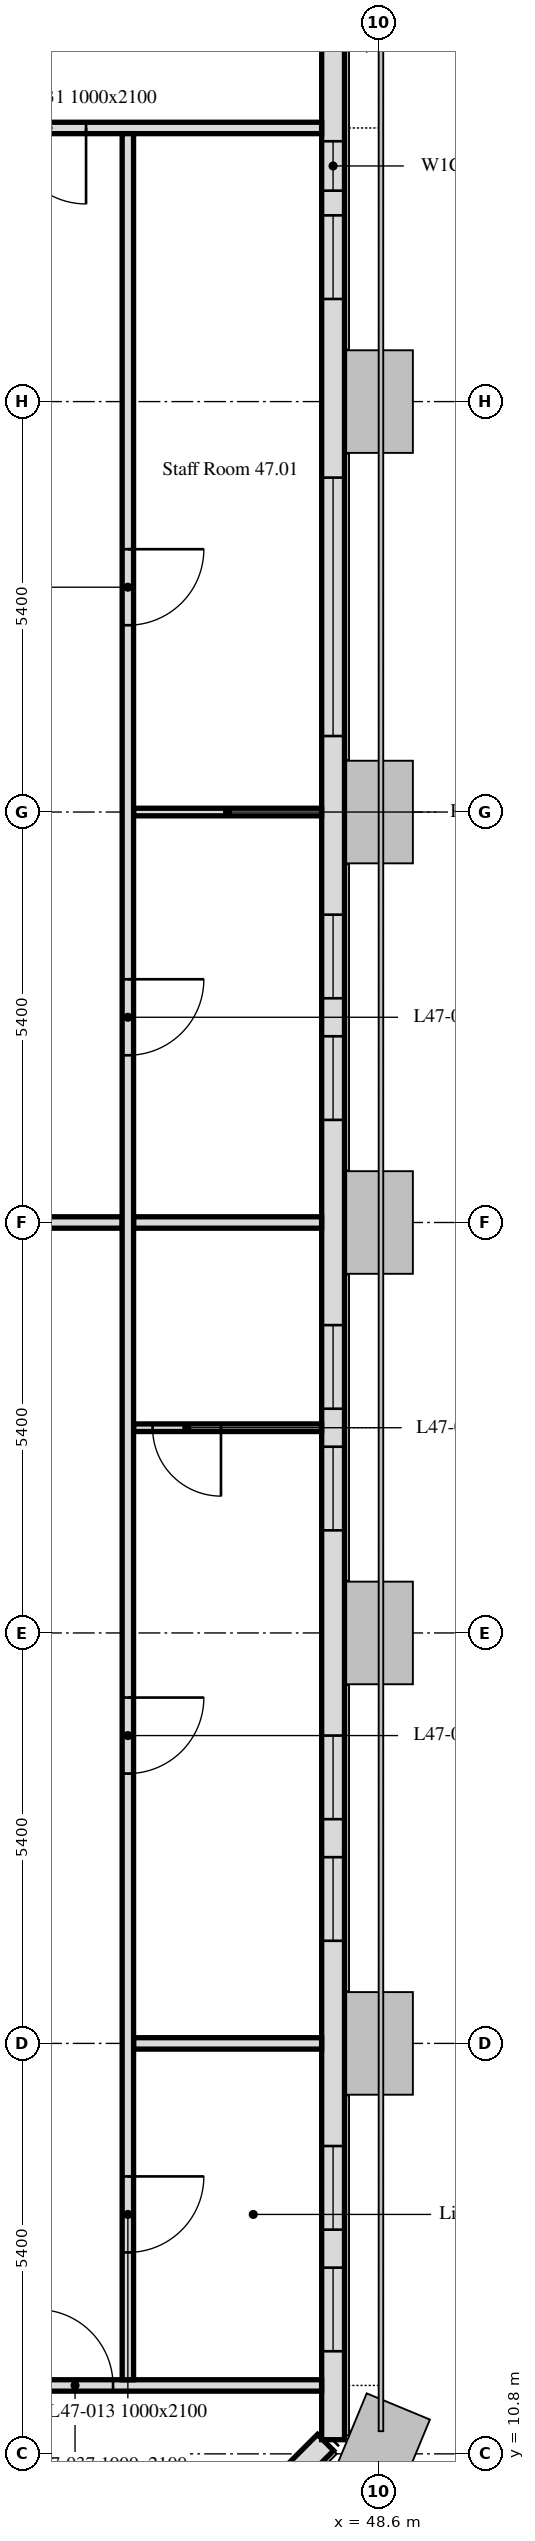
"""IFC4 building model, lengths in metres.
Left out: names, types, materials, properties, quantities, classifications, styles, units other than length and angle.
Written with IfcOpenShell. Run it as: python <this file> out.ifc"""

import sys

from ifc_helpers import new_model, si_unit, direction, frame, frame_2d, origin, place, context, subcontext, project, spatial, rectangle, extrude, element, fill, save


model = new_model("IFC4")
c1 = context("Model", 3, precision=1e-05, world=origin(), true_north=direction((0.0, 1.0)))
c2 = subcontext(c1, "Body", "Model", "MODEL_VIEW")
j1 = project(units=[si_unit("LENGTHUNIT", "METRE"), si_unit("PLANEANGLEUNIT", "RADIAN")], contexts=[c1])
p1 = place(None, origin())
s1 = spatial("IfcSite", under=j1, at=p1, CompositionType="ELEMENT")
p2 = place(p1, origin())
s2 = spatial("IfcBuilding", under=s1, at=p2, CompositionType="ELEMENT")
p3 = place(p2, frame((0.0, 0.0, 193.9)))
s3 = spatial("IfcBuildingStorey", under=s2, at=p3, CompositionType="ELEMENT", Elevation=193.9)
p4 = place(p3, frame((43.051, 6.099, 0.0), z_axis=(0.0, 0.0, 1.0), x_axis=(0.707106781187, 0.707106781187, 0.0)))
e1 = element("IfcWall", 1, at=p4, inside=s3, PredefinedType="SOLIDWALL", context=c2, shape_type="SweptSolid", body=[
    extrude(rectangle(XDim=6.86, YDim=0.3, at=frame_2d((3.43, 0.0))), origin(), (0.0, 0.0, 1.0), 3.0),
])
p5 = place(p4, frame((1.73, 0.0, 0.9)))
e2 = element("IfcOpeningElement", 2, at=p5, cuts=e1, PredefinedType="OPENING", context=c2, shape_type="SweptSolid", body=[
    extrude(rectangle(XDim=3.4, YDim=1.7, at=frame_2d((1.7, 0.85))), frame((0.0, 0.16, 0.0), z_axis=(0.0, -1.0, 0.0), x_axis=(1.0, 0.0, 0.0)), (0.0, 0.0, 1.0), 0.32),
])
p6 = place(p3, frame((48.0, 10.986, 0.0), z_axis=(0.0, 0.0, 1.0), x_axis=(0.0, 1.0, 0.0)))
e3 = element("IfcWall", 3, at=p6, inside=s3, PredefinedType="SOLIDWALL", context=c2, shape_type="SweptSolid", body=[
    extrude(rectangle(XDim=32.027, YDim=0.3, at=frame_2d((16.014, 0.0))), origin(), (0.0, 0.0, 1.0), 3.0),
])
p7 = place(p6, frame((1.164, 0.0, 0.9)))
e4 = element("IfcOpeningElement", 4, at=p7, cuts=e3, PredefinedType="OPENING", context=c2, shape_type="SweptSolid", body=[
    extrude(rectangle(XDim=1.1, YDim=1.7, at=frame_2d((0.55, 0.85))), frame((0.0, 0.16, 0.0), z_axis=(0.0, -1.0, 0.0), x_axis=(1.0, 0.0, 0.0)), (0.0, 0.0, 1.0), 0.32),
])
p8 = place(p6, frame((2.764, 0.0, 0.9)))
e5 = element("IfcOpeningElement", 5, at=p8, cuts=e3, PredefinedType="OPENING", context=c2, shape_type="SweptSolid", body=[
    extrude(rectangle(XDim=1.1, YDim=1.7, at=frame_2d((0.55, 0.85))), frame((0.0, 0.16, 0.0), z_axis=(0.0, -1.0, 0.0), x_axis=(1.0, 0.0, 0.0)), (0.0, 0.0, 1.0), 0.32),
])
p9 = place(p6, frame((6.564, 0.0, 0.9)))
e6 = element("IfcOpeningElement", 6, at=p9, cuts=e3, PredefinedType="OPENING", context=c2, shape_type="SweptSolid", body=[
    extrude(rectangle(XDim=1.1, YDim=1.7, at=frame_2d((0.55, 0.85))), frame((0.0, 0.16, 0.0), z_axis=(0.0, -1.0, 0.0), x_axis=(1.0, 0.0, 0.0)), (0.0, 0.0, 1.0), 0.32),
])
p10 = place(p6, frame((8.164, 0.0, 0.9)))
e7 = element("IfcOpeningElement", 7, at=p10, cuts=e3, PredefinedType="OPENING", context=c2, shape_type="SweptSolid", body=[
    extrude(rectangle(XDim=1.1, YDim=1.7, at=frame_2d((0.55, 0.85))), frame((0.0, 0.16, 0.0), z_axis=(0.0, -1.0, 0.0), x_axis=(1.0, 0.0, 0.0)), (0.0, 0.0, 1.0), 0.32),
])
p11 = place(p6, frame((11.964, 0.0, 0.9)))
e8 = element("IfcOpeningElement", 8, at=p11, cuts=e3, PredefinedType="OPENING", context=c2, shape_type="SweptSolid", body=[
    extrude(rectangle(XDim=1.1, YDim=1.7, at=frame_2d((0.55, 0.85))), frame((0.0, 0.16, 0.0), z_axis=(0.0, -1.0, 0.0), x_axis=(1.0, 0.0, 0.0)), (0.0, 0.0, 1.0), 0.32),
])
p12 = place(p6, frame((13.564, 0.0, 0.9)))
e9 = element("IfcOpeningElement", 9, at=p12, cuts=e3, PredefinedType="OPENING", context=c2, shape_type="SweptSolid", body=[
    extrude(rectangle(XDim=1.1, YDim=1.7, at=frame_2d((0.55, 0.85))), frame((0.0, 0.16, 0.0), z_axis=(0.0, -1.0, 0.0), x_axis=(1.0, 0.0, 0.0)), (0.0, 0.0, 1.0), 0.32),
])
p13 = place(p6, frame((17.364, 0.0, 0.9)))
e10 = element("IfcOpeningElement", 10, at=p13, cuts=e3, PredefinedType="OPENING", context=c2, shape_type="SweptSolid", body=[
    extrude(rectangle(XDim=1.1, YDim=1.7, at=frame_2d((0.55, 0.85))), frame((0.0, 0.16, 0.0), z_axis=(0.0, -1.0, 0.0), x_axis=(1.0, 0.0, 0.0)), (0.0, 0.0, 1.0), 0.32),
])
p14 = place(p6, frame((18.964, 0.0, 0.9)))
e11 = element("IfcOpeningElement", 11, at=p14, cuts=e3, PredefinedType="OPENING", context=c2, shape_type="SweptSolid", body=[
    extrude(rectangle(XDim=1.1, YDim=1.7, at=frame_2d((0.55, 0.85))), frame((0.0, 0.16, 0.0), z_axis=(0.0, -1.0, 0.0), x_axis=(1.0, 0.0, 0.0)), (0.0, 0.0, 1.0), 0.32),
])
p15 = place(p6, frame((22.414, 0.0, 0.9)))
e12 = element("IfcOpeningElement", 12, at=p15, cuts=e3, PredefinedType="OPENING", context=c2, shape_type="SweptSolid", body=[
    extrude(rectangle(XDim=3.4, YDim=1.7, at=frame_2d((1.7, 0.85))), frame((0.0, 0.16, 0.0), z_axis=(0.0, -1.0, 0.0), x_axis=(1.0, 0.0, 0.0)), (0.0, 0.0, 1.0), 0.32),
])
p16 = place(p6, frame((28.164, 0.0, 0.9)))
e13 = element("IfcOpeningElement", 13, at=p16, cuts=e3, PredefinedType="OPENING", context=c2, shape_type="SweptSolid", body=[
    extrude(rectangle(XDim=1.1, YDim=1.7, at=frame_2d((0.55, 0.85))), frame((0.0, 0.16, 0.0), z_axis=(0.0, -1.0, 0.0), x_axis=(1.0, 0.0, 0.0)), (0.0, 0.0, 1.0), 0.32),
])
p17 = place(p6, frame((29.589, 0.0, 0.9)))
e14 = element("IfcOpeningElement", 14, at=p17, cuts=e3, PredefinedType="OPENING", context=c2, shape_type="SweptSolid", body=[
    extrude(rectangle(XDim=0.65, YDim=1.7, at=frame_2d((0.325, 0.85))), frame((0.0, 0.16, 0.0), z_axis=(0.0, -1.0, 0.0), x_axis=(1.0, 0.0, 0.0)), (0.0, 0.0, 1.0), 0.32),
])
p18 = place(p3, frame((45.375, 32.4, 0.0), z_axis=(0.0, 0.0, 1.0), x_axis=(1.0, 0.0, 0.0)))
e15 = element("IfcWall", 15, at=p18, inside=s3, PredefinedType="PARTITIONING", context=c2, shape_type="SweptSolid", body=[
    extrude(rectangle(XDim=2.474, YDim=0.1, at=frame_2d((1.237, 0.0))), origin(), (0.0, 0.0, 1.0), 2.4),
])
p19 = place(p3, frame((47.849, 41.4, 0.0), z_axis=(0.0, 0.0, 1.0), x_axis=(-1.0, 0.0, 0.0)))
e16 = element("IfcWall", 16, at=p19, inside=s3, PredefinedType="PARTITIONING", context=c2, shape_type="SweptSolid", body=[
    extrude(rectangle(XDim=41.698, YDim=0.15, at=frame_2d((20.849, 0.0))), origin(), (0.0, 0.0, 1.0), 2.4),
])
p20 = place(p19, frame((39.249, 0.0, 0.0)))
e17 = element("IfcOpeningElement", 17, at=p20, cuts=e16, PredefinedType="OPENING", context=c2, shape_type="SweptSolid", body=[
    extrude(rectangle(XDim=1.0, YDim=2.1, at=frame_2d((0.5, 1.05))), frame((0.0, 0.075, 0.0), z_axis=(0.0, -1.0, 0.0), x_axis=(1.0, 0.0, 0.0)), (0.0, 0.0, 1.0), 0.15),
])
p21 = place(p19, frame((11.449, 0.0, 0.0)))
e18 = element("IfcOpeningElement", 18, at=p21, cuts=e16, PredefinedType="OPENING", context=c2, shape_type="SweptSolid", body=[
    extrude(rectangle(XDim=1.0, YDim=2.1, at=frame_2d((0.5, 1.05))), frame((0.0, 0.075, 0.0), z_axis=(0.0, -1.0, 0.0), x_axis=(1.0, 0.0, 0.0)), (0.0, 0.0, 1.0), 0.15),
])
p22 = place(p19, frame((3.099, 0.0, 0.0)))
e19 = element("IfcOpeningElement", 19, at=p22, cuts=e16, PredefinedType="OPENING", context=c2, shape_type="SweptSolid", body=[
    extrude(rectangle(XDim=1.0, YDim=2.1, at=frame_2d((0.5, 1.05))), frame((0.0, 0.075, 0.0), z_axis=(0.0, -1.0, 0.0), x_axis=(1.0, 0.0, 0.0)), (0.0, 0.0, 1.0), 0.15),
])
p23 = place(p19, frame((23.049, 0.0, 0.0)))
e20 = element("IfcOpeningElement", 20, at=p23, cuts=e16, PredefinedType="OPENING", context=c2, shape_type="SweptSolid", body=[
    extrude(rectangle(XDim=1.0, YDim=2.1, at=frame_2d((0.5, 1.05))), frame((0.0, 0.075, 0.0), z_axis=(0.0, -1.0, 0.0), x_axis=(1.0, 0.0, 0.0)), (0.0, 0.0, 1.0), 0.15),
])
p24 = place(p3, frame((45.375, 27.0, 0.0), z_axis=(0.0, 0.0, 1.0), x_axis=(1.0, 0.0, 0.0)))
e21 = element("IfcWall", 21, at=p24, inside=s3, PredefinedType="PARTITIONING", context=c2, shape_type="SweptSolid", body=[
    extrude(rectangle(XDim=2.474, YDim=0.15, at=frame_2d((1.237, 0.0))), origin(), (0.0, 0.0, 1.0), 2.4),
])
p25 = place(p3, frame((43.2, 27.0, 0.0), z_axis=(0.0, 0.0, 1.0), x_axis=(1.0, 0.0, 0.0)))
e22 = element("IfcWall", 22, at=p25, inside=s3, PredefinedType="PARTITIONING", context=c2, shape_type="SweptSolid", body=[
    extrude(rectangle(XDim=2.025, YDim=0.15, at=frame_2d((1.013, 0.0))), origin(), (0.0, 0.0, 1.0), 2.4),
])
p26 = place(p3, frame((47.849, 16.2, 0.0), z_axis=(0.0, 0.0, 1.0), x_axis=(-1.0, 0.0, 0.0)))
e23 = element("IfcWall", 23, at=p26, inside=s3, PredefinedType="PARTITIONING", context=c2, shape_type="SweptSolid", body=[
    extrude(rectangle(XDim=2.474, YDim=0.15, at=frame_2d((1.237, 0.0))), origin(), (0.0, 0.0, 1.0), 2.4),
])
p27 = place(p3, frame((6.151, 11.7, 0.0), z_axis=(0.0, 0.0, 1.0), x_axis=(1.0, 0.0, 0.0)))
e24 = element("IfcWall", 24, at=p27, inside=s3, PredefinedType="PARTITIONING", context=c2, shape_type="SweptSolid", body=[
    extrude(rectangle(XDim=41.698, YDim=0.15, at=frame_2d((20.849, 0.0))), origin(), (0.0, 0.0, 1.0), 3.0),
])
p28 = place(p27, frame((17.649, 0.0, 0.0)))
e25 = element("IfcOpeningElement", 25, at=p28, cuts=e24, PredefinedType="OPENING", context=c2, shape_type="SweptSolid", body=[
    extrude(rectangle(XDim=1.0, YDim=2.1, at=frame_2d((0.5, 1.05))), frame((0.0, 0.075, 0.0), z_axis=(0.0, -1.0, 0.0), x_axis=(1.0, 0.0, 0.0)), (0.0, 0.0, 1.0), 0.15),
])
p29 = place(p27, frame((1.449, 0.0, 0.0)))
e26 = element("IfcOpeningElement", 26, at=p29, cuts=e24, PredefinedType="OPENING", context=c2, shape_type="SweptSolid", body=[
    extrude(rectangle(XDim=1.0, YDim=2.1, at=frame_2d((0.5, 1.05))), frame((0.0, 0.075, 0.0), z_axis=(0.0, -1.0, 0.0), x_axis=(1.0, 0.0, 0.0)), (0.0, 0.0, 1.0), 0.15),
])
p30 = place(p27, frame((29.249, 0.0, 0.0)))
e27 = element("IfcOpeningElement", 27, at=p30, cuts=e24, PredefinedType="OPENING", context=c2, shape_type="SweptSolid", body=[
    extrude(rectangle(XDim=1.0, YDim=2.1, at=frame_2d((0.5, 1.05))), frame((0.0, 0.075, 0.0), z_axis=(0.0, -1.0, 0.0), x_axis=(1.0, 0.0, 0.0)), (0.0, 0.0, 1.0), 0.15),
])
p31 = place(p27, frame((37.954, 0.0, 0.0)))
e28 = element("IfcOpeningElement", 28, at=p31, cuts=e24, PredefinedType="OPENING", context=c2, shape_type="SweptSolid", body=[
    extrude(rectangle(XDim=1.0, YDim=2.1, at=frame_2d((0.5, 1.05))), frame((0.0, 0.075, 0.0), z_axis=(0.0, -1.0, 0.0), x_axis=(1.0, 0.0, 0.0)), (0.0, 0.0, 1.0), 0.15),
])
p32 = place(p3, frame((47.849, 24.3, 0.0), z_axis=(0.0, 0.0, 1.0), x_axis=(-1.0, 0.0, 0.0)))
e29 = element("IfcWall", 29, at=p32, inside=s3, PredefinedType="PARTITIONING", context=c2, shape_type="SweptSolid", body=[
    extrude(rectangle(XDim=2.474, YDim=0.1, at=frame_2d((1.237, 0.0))), origin(), (0.0, 0.0, 1.0), 3.0),
])
p33 = place(p32, frame((1.324, 0.0, 0.0)))
e30 = element("IfcOpeningElement", 30, at=p33, cuts=e29, PredefinedType="OPENING", context=c2, shape_type="SweptSolid", body=[
    extrude(rectangle(XDim=0.9, YDim=2.1, at=frame_2d((0.45, 1.05))), frame((0.0, 0.05, 0.0), z_axis=(0.0, -1.0, 0.0), x_axis=(1.0, 0.0, 0.0)), (0.0, 0.0, 1.0), 0.1),
])
p34 = place(p3, frame((45.3, 41.325, 0.0), z_axis=(0.0, 0.0, 1.0), x_axis=(0.0, -1.0, 0.0)))
e31 = element("IfcWall", 31, at=p34, inside=s3, PredefinedType="PARTITIONING", context=c2, shape_type="SweptSolid", body=[
    extrude(rectangle(XDim=29.55, YDim=0.15, at=frame_2d((14.775, 0.0))), origin(), (0.0, 0.0, 1.0), 2.4),
])
p35 = place(p34, frame((5.467, 0.0, 0.0)))
e32 = element("IfcOpeningElement", 32, at=p35, cuts=e31, PredefinedType="OPENING", context=c2, shape_type="SweptSolid", body=[
    extrude(rectangle(XDim=1.0, YDim=2.1, at=frame_2d((0.5, 1.05))), frame((0.0, 0.075, 0.0), z_axis=(0.0, -1.0, 0.0), x_axis=(1.0, 0.0, 0.0)), (0.0, 0.0, 1.0), 0.15),
])
p36 = place(p34, frame((11.125, 0.0, 0.0)))
e33 = element("IfcOpeningElement", 33, at=p36, cuts=e31, PredefinedType="OPENING", context=c2, shape_type="SweptSolid", body=[
    extrude(rectangle(XDim=1.0, YDim=2.1, at=frame_2d((0.5, 1.05))), frame((0.0, 0.075, 0.0), z_axis=(0.0, -1.0, 0.0), x_axis=(1.0, 0.0, 0.0)), (0.0, 0.0, 1.0), 0.15),
])
p37 = place(p34, frame((26.875, 0.0, 0.0)))
e34 = element("IfcOpeningElement", 34, at=p37, cuts=e31, PredefinedType="OPENING", context=c2, shape_type="SweptSolid", body=[
    extrude(rectangle(XDim=1.0, YDim=2.1, at=frame_2d((0.5, 1.05))), frame((0.0, 0.075, 0.0), z_axis=(0.0, -1.0, 0.0), x_axis=(1.0, 0.0, 0.0)), (0.0, 0.0, 1.0), 0.15),
])
p38 = place(p34, frame((20.575, 0.0, 0.0)))
e35 = element("IfcOpeningElement", 35, at=p38, cuts=e31, PredefinedType="OPENING", context=c2, shape_type="SweptSolid", body=[
    extrude(rectangle(XDim=1.0, YDim=2.1, at=frame_2d((0.5, 1.05))), frame((0.0, 0.075, 0.0), z_axis=(0.0, -1.0, 0.0), x_axis=(1.0, 0.0, 0.0)), (0.0, 0.0, 1.0), 0.15),
])
p39 = place(p7, origin())
e36 = element("IfcWindow", 36, at=p39, inside=s3, PartitioningType="SINGLE_PANEL", PredefinedType="WINDOW", context=c2, shape_type="SweptSolid", body=[
    extrude(rectangle(XDim=1.1, YDim=1.7, at=frame_2d((0.55, 0.85))), frame((0.0, 0.03, 0.0), z_axis=(0.0, -1.0, 0.0), x_axis=(1.0, 0.0, 0.0)), (0.0, 0.0, 1.0), 0.06),
])
fill(e4, e36)
p40 = place(p8, origin())
e37 = element("IfcWindow", 37, at=p40, inside=s3, PartitioningType="SINGLE_PANEL", PredefinedType="WINDOW", context=c2, shape_type="SweptSolid", body=[
    extrude(rectangle(XDim=1.1, YDim=1.7, at=frame_2d((0.55, 0.85))), frame((0.0, 0.03, 0.0), z_axis=(0.0, -1.0, 0.0), x_axis=(1.0, 0.0, 0.0)), (0.0, 0.0, 1.0), 0.06),
])
fill(e5, e37)
p41 = place(p9, origin())
e38 = element("IfcWindow", 38, at=p41, inside=s3, PartitioningType="SINGLE_PANEL", PredefinedType="WINDOW", context=c2, shape_type="SweptSolid", body=[
    extrude(rectangle(XDim=1.1, YDim=1.7, at=frame_2d((0.55, 0.85))), frame((0.0, 0.03, 0.0), z_axis=(0.0, -1.0, 0.0), x_axis=(1.0, 0.0, 0.0)), (0.0, 0.0, 1.0), 0.06),
])
fill(e6, e38)
p42 = place(p10, origin())
e39 = element("IfcWindow", 39, at=p42, inside=s3, PartitioningType="SINGLE_PANEL", PredefinedType="WINDOW", context=c2, shape_type="SweptSolid", body=[
    extrude(rectangle(XDim=1.1, YDim=1.7, at=frame_2d((0.55, 0.85))), frame((0.0, 0.03, 0.0), z_axis=(0.0, -1.0, 0.0), x_axis=(1.0, 0.0, 0.0)), (0.0, 0.0, 1.0), 0.06),
])
fill(e7, e39)
p43 = place(p11, origin())
e40 = element("IfcWindow", 40, at=p43, inside=s3, PartitioningType="SINGLE_PANEL", PredefinedType="WINDOW", context=c2, shape_type="SweptSolid", body=[
    extrude(rectangle(XDim=1.1, YDim=1.7, at=frame_2d((0.55, 0.85))), frame((0.0, 0.03, 0.0), z_axis=(0.0, -1.0, 0.0), x_axis=(1.0, 0.0, 0.0)), (0.0, 0.0, 1.0), 0.06),
])
fill(e8, e40)
p44 = place(p12, origin())
e41 = element("IfcWindow", 41, at=p44, inside=s3, PartitioningType="SINGLE_PANEL", PredefinedType="WINDOW", context=c2, shape_type="SweptSolid", body=[
    extrude(rectangle(XDim=1.1, YDim=1.7, at=frame_2d((0.55, 0.85))), frame((0.0, 0.03, 0.0), z_axis=(0.0, -1.0, 0.0), x_axis=(1.0, 0.0, 0.0)), (0.0, 0.0, 1.0), 0.06),
])
fill(e9, e41)
p45 = place(p13, origin())
e42 = element("IfcWindow", 42, at=p45, inside=s3, PartitioningType="SINGLE_PANEL", PredefinedType="WINDOW", context=c2, shape_type="SweptSolid", body=[
    extrude(rectangle(XDim=1.1, YDim=1.7, at=frame_2d((0.55, 0.85))), frame((0.0, 0.03, 0.0), z_axis=(0.0, -1.0, 0.0), x_axis=(1.0, 0.0, 0.0)), (0.0, 0.0, 1.0), 0.06),
])
fill(e10, e42)
p46 = place(p14, origin())
e43 = element("IfcWindow", 43, at=p46, inside=s3, PartitioningType="SINGLE_PANEL", PredefinedType="WINDOW", context=c2, shape_type="SweptSolid", body=[
    extrude(rectangle(XDim=1.1, YDim=1.7, at=frame_2d((0.55, 0.85))), frame((0.0, 0.03, 0.0), z_axis=(0.0, -1.0, 0.0), x_axis=(1.0, 0.0, 0.0)), (0.0, 0.0, 1.0), 0.06),
])
fill(e11, e43)
p47 = place(p15, origin())
e44 = element("IfcWindow", 44, at=p47, inside=s3, PartitioningType="SINGLE_PANEL", PredefinedType="WINDOW", context=c2, shape_type="SweptSolid", body=[
    extrude(rectangle(XDim=3.4, YDim=1.7, at=frame_2d((1.7, 0.85))), frame((0.0, 0.03, 0.0), z_axis=(0.0, -1.0, 0.0), x_axis=(1.0, 0.0, 0.0)), (0.0, 0.0, 1.0), 0.06),
])
fill(e12, e44)
p48 = place(p16, origin())
e45 = element("IfcWindow", 45, at=p48, inside=s3, PartitioningType="SINGLE_PANEL", PredefinedType="WINDOW", context=c2, shape_type="SweptSolid", body=[
    extrude(rectangle(XDim=1.1, YDim=1.7, at=frame_2d((0.55, 0.85))), frame((0.0, 0.03, 0.0), z_axis=(0.0, -1.0, 0.0), x_axis=(1.0, 0.0, 0.0)), (0.0, 0.0, 1.0), 0.06),
])
fill(e13, e45)
p49 = place(p17, origin())
e46 = element("IfcWindow", 46, at=p49, inside=s3, PartitioningType="SINGLE_PANEL", PredefinedType="WINDOW", context=c2, shape_type="SweptSolid", body=[
    extrude(rectangle(XDim=0.65, YDim=1.7, at=frame_2d((0.325, 0.85))), frame((0.0, 0.03, 0.0), z_axis=(0.0, -1.0, 0.0), x_axis=(1.0, 0.0, 0.0)), (0.0, 0.0, 1.0), 0.06),
])
fill(e14, e46)
p50 = place(p35, origin())
e47 = element("IfcDoor", 47, at=p50, inside=s3, OperationType="SINGLE_SWING_LEFT", PredefinedType="DOOR", context=c2, shape_type="SweptSolid", body=[
    extrude(rectangle(XDim=1.0, YDim=2.1, at=frame_2d((0.5, 1.05))), frame((0.0, 0.025, 0.0), z_axis=(0.0, -1.0, 0.0), x_axis=(1.0, 0.0, 0.0)), (0.0, 0.0, 1.0), 0.05),
])
fill(e32, e47)
p51 = place(p36, origin())
e48 = element("IfcDoor", 48, at=p51, inside=s3, OperationType="SINGLE_SWING_RIGHT", PredefinedType="DOOR", context=c2, shape_type="SweptSolid", body=[
    extrude(rectangle(XDim=1.0, YDim=2.1, at=frame_2d((0.5, 1.05))), frame((0.0, 0.025, 0.0), z_axis=(0.0, -1.0, 0.0), x_axis=(1.0, 0.0, 0.0)), (0.0, 0.0, 1.0), 0.05),
])
fill(e33, e48)
p52 = place(p37, origin())
e49 = element("IfcDoor", 49, at=p52, inside=s3, OperationType="SINGLE_SWING_LEFT", PredefinedType="DOOR", context=c2, shape_type="SweptSolid", body=[
    extrude(rectangle(XDim=1.0, YDim=2.1, at=frame_2d((0.5, 1.05))), frame((0.0, 0.025, 0.0), z_axis=(0.0, -1.0, 0.0), x_axis=(1.0, 0.0, 0.0)), (0.0, 0.0, 1.0), 0.05),
])
fill(e34, e49)
p53 = place(p33, origin())
e50 = element("IfcDoor", 50, at=p53, inside=s3, OperationType="SINGLE_SWING_RIGHT", PredefinedType="DOOR", context=c2, shape_type="SweptSolid", body=[
    extrude(rectangle(XDim=0.9, YDim=2.1, at=frame_2d((0.45, 1.05))), frame((0.0, 0.025, 0.0), z_axis=(0.0, -1.0, 0.0), x_axis=(1.0, 0.0, 0.0)), (0.0, 0.0, 1.0), 0.05),
])
fill(e30, e50)
p54 = place(p22, origin())
e51 = element("IfcDoor", 51, at=p54, inside=s3, OperationType="SINGLE_SWING_LEFT", PredefinedType="DOOR", context=c2, shape_type="SweptSolid", body=[
    extrude(rectangle(XDim=1.0, YDim=2.1, at=frame_2d((0.5, 1.05))), frame((0.0, 0.025, 0.0), z_axis=(0.0, -1.0, 0.0), x_axis=(1.0, 0.0, 0.0)), (0.0, 0.0, 1.0), 0.05),
])
fill(e19, e51)
p55 = place(p31, origin())
e52 = element("IfcDoor", 52, at=p55, inside=s3, OperationType="SINGLE_SWING_LEFT", PredefinedType="DOOR", context=c2, shape_type="SweptSolid", body=[
    extrude(rectangle(XDim=1.0, YDim=2.1, at=frame_2d((0.5, 1.05))), frame((0.0, 0.025, 0.0), z_axis=(0.0, -1.0, 0.0), x_axis=(1.0, 0.0, 0.0)), (0.0, 0.0, 1.0), 0.05),
])
fill(e28, e52)
p56 = place(p38, origin())
e53 = element("IfcDoor", 53, at=p56, inside=s3, OperationType="SINGLE_SWING_RIGHT", PredefinedType="DOOR", context=c2, shape_type="SweptSolid", body=[
    extrude(rectangle(XDim=1.0, YDim=2.1, at=frame_2d((0.5, 1.05))), frame((0.0, 0.025, 0.0), z_axis=(0.0, -1.0, 0.0), x_axis=(1.0, 0.0, 0.0)), (0.0, 0.0, 1.0), 0.05),
])
fill(e35, e53)
save(model, sys.argv[1])
